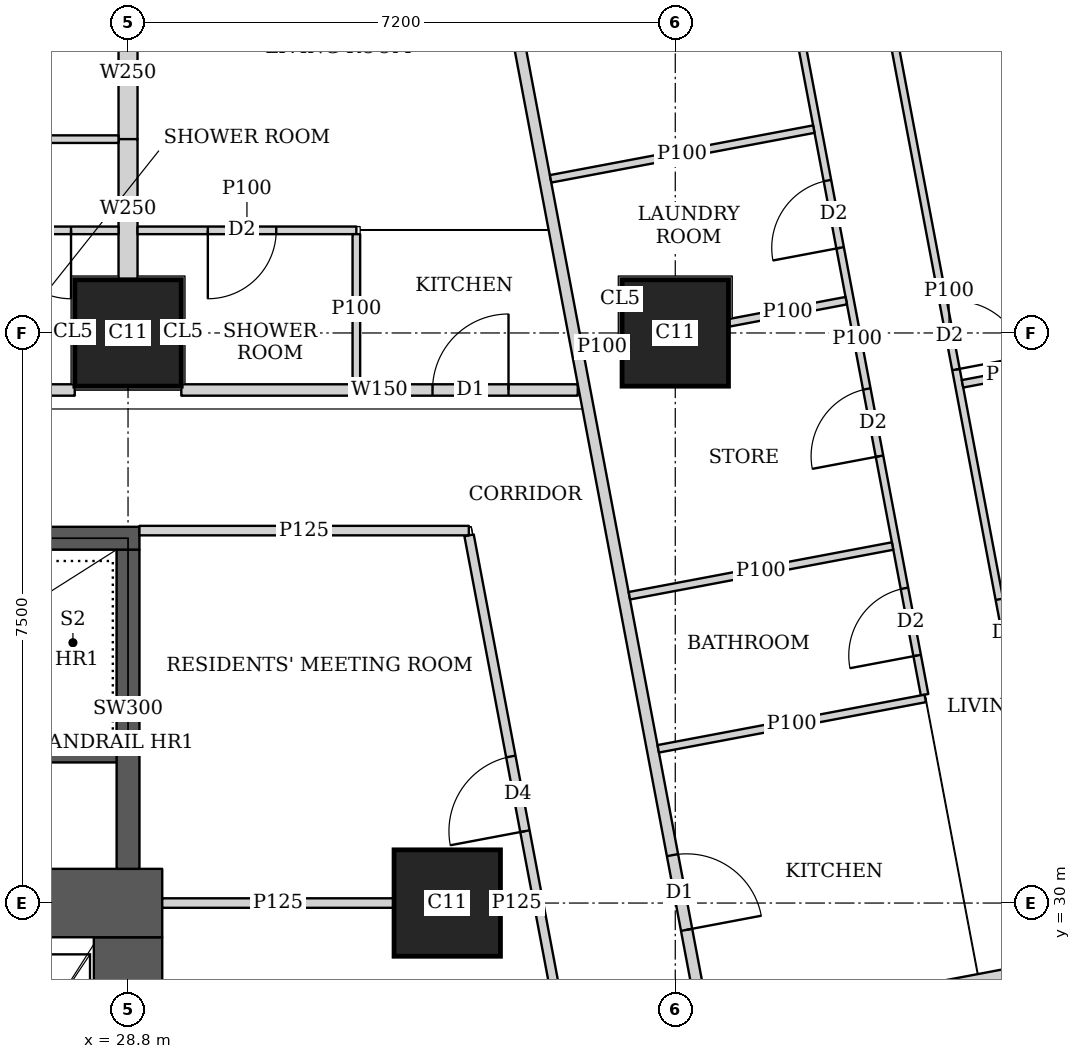
"""IFC4 building model, lengths in metres.
Left out: names, types, materials, properties, quantities, classifications, styles, units other than length and angle.
Written with IfcOpenShell. Run it as: python <this file> out.ifc"""

import sys

from ifc_helpers import new_model, si_unit, direction, frame, frame_2d, origin, origin_2d, place, context, subcontext, project, spatial, rectangle, extrude, element, fill, save


model = new_model("IFC4")
c1 = context("Model", 3, precision=1e-05, world=origin(), true_north=direction((0.0, 1.0)))
c2 = subcontext(c1, "Body", "Model", "MODEL_VIEW")
j1 = project(units=[si_unit("LENGTHUNIT", "METRE"), si_unit("PLANEANGLEUNIT", "RADIAN")], contexts=[c1])
p1 = place(None, origin())
s1 = spatial("IfcSite", under=j1, at=p1, CompositionType="ELEMENT")
p2 = place(p1, origin())
s2 = spatial("IfcBuilding", under=s1, at=p2, CompositionType="ELEMENT")
p3 = place(p2, frame((0.0, 0.0, 281.6)))
s3 = spatial("IfcBuildingStorey", under=s2, at=p3, CompositionType="ELEMENT", Elevation=281.6)
for number, where, z_axis, x_axis in (
    (1, (33.0, 30.0, 0.0), (0.0, 0.0, 1.0), (1.0, 0.0, 0.0)),
    (2, (28.8, 37.5, 0.0), (0.0, 0.0, 1.0), (1.0, 0.0, 0.0)),
    (3, (36.0, 37.5, 0.0), (0.0, 0.0, 1.0), (1.0, 0.0, 0.0)),
):
    element("IfcColumn", number, at=place(p3, frame(where, z_axis=z_axis, x_axis=x_axis)), inside=s3, PredefinedType="COLUMN", context=c2, shape_type="SweptSolid", body=[
        extrude(rectangle(XDim=1.4, YDim=1.4, at=origin_2d()), origin(), (0.0, 0.0, 1.0), 3.75),
    ])
p4 = place(p3, frame((13.95, 30.0, 0.0), z_axis=(0.0, 0.0, 1.0), x_axis=(1.0, 0.0, 0.0)))
e4 = element("IfcWall", 4, at=p4, inside=s3, PredefinedType="SHEAR", context=c2, shape_type="SweptSolid", body=[
    extrude(rectangle(XDim=15.3, YDim=0.9, at=frame_2d((7.65, 0.0))), origin(), (0.0, 0.0, 1.0), 3.75),
])
p5 = place(p4, frame((4.45, 0.0, 0.0)))
e5 = element("IfcOpeningElement", 5, at=p5, cuts=e4, PredefinedType="OPENING", context=c2, shape_type="SweptSolid", body=[
    extrude(rectangle(XDim=1.8, YDim=2.1, at=frame_2d((0.9, 1.05))), frame((0.0, 0.46, 0.0), z_axis=(0.0, -1.0, 0.0), x_axis=(1.0, 0.0, 0.0)), (0.0, 0.0, 1.0), 0.92),
])
p6 = place(p4, frame((10.7, 0.0, 0.0)))
e6 = element("IfcOpeningElement", 6, at=p6, cuts=e4, PredefinedType="OPENING", context=c2, shape_type="SweptSolid", body=[
    extrude(rectangle(XDim=1.1, YDim=2.1, at=frame_2d((0.55, 1.05))), frame((0.0, 0.46, 0.0), z_axis=(0.0, -1.0, 0.0), x_axis=(1.0, 0.0, 0.0)), (0.0, 0.0, 1.0), 0.92),
])
p7 = place(p3, frame((28.8, 15.45, 0.0), z_axis=(0.0, 0.0, 1.0), x_axis=(0.0, 1.0, 0.0)))
e7 = element("IfcWall", 7, at=p7, inside=s3, PredefinedType="SHEAR", context=c2, shape_type="SweptSolid", body=[
    extrude(rectangle(XDim=14.1, YDim=0.9, at=frame_2d((7.05, 0.0))), origin(), (0.0, 0.0, 1.0), 3.75),
])
p8 = place(p3, frame((21.45, 34.8, 0.0), z_axis=(0.0, 0.0, 1.0), x_axis=(1.0, 0.0, 0.0)))
e8 = element("IfcWall", 8, at=p8, inside=s3, PredefinedType="SHEAR", context=c2, shape_type="SweptSolid", body=[
    extrude(rectangle(XDim=7.5, YDim=0.3, at=frame_2d((3.75, 0.0))), origin(), (0.0, 0.0, 1.0), 3.75),
])
p9 = place(p8, frame((0.5, 0.0, 0.0)))
e9 = element("IfcOpeningElement", 9, at=p9, cuts=e8, PredefinedType="OPENING", context=c2, shape_type="SweptSolid", body=[
    extrude(rectangle(XDim=1.1, YDim=2.1, at=frame_2d((0.55, 1.05))), frame((0.0, 0.16, 0.0), z_axis=(0.0, -1.0, 0.0), x_axis=(1.0, 0.0, 0.0)), (0.0, 0.0, 1.0), 0.32),
])
p10 = place(p3, frame((28.8, 30.45, 0.0), z_axis=(0.0, 0.0, 1.0), x_axis=(0.0, 1.0, 0.0)))
e10 = element("IfcWall", 10, at=p10, inside=s3, PredefinedType="SHEAR", context=c2, shape_type="SweptSolid", body=[
    extrude(rectangle(XDim=4.2, YDim=0.3, at=frame_2d((2.1, 0.0))), origin(), (0.0, 0.0, 1.0), 3.75),
])
p11 = place(p3, frame((22.301, 36.75, 0.0), z_axis=(0.0, 0.0, 1.0), x_axis=(1.0, 0.0, 0.0)))
e11 = element("IfcWall", 11, at=p11, inside=s3, PredefinedType="SOLIDWALL", context=c2, shape_type="SweptSolid", body=[
    extrude(rectangle(XDim=5.798, YDim=0.15, at=frame_2d((2.899, 0.0))), origin(), (0.0, 0.0, 1.0), 3.5),
])
p12 = place(p3, frame((29.501, 36.75, 0.0), z_axis=(0.0, 0.0, 1.0), x_axis=(1.0, 0.0, 0.0)))
e12 = element("IfcWall", 12, at=p12, inside=s3, PredefinedType="SOLIDWALL", context=c2, shape_type="SweptSolid", body=[
    extrude(rectangle(XDim=5.216, YDim=0.15, at=frame_2d((2.608, 0.0))), origin(), (0.0, 0.0, 1.0), 3.5),
])
p13 = place(p12, frame((3.305, 0.0, 0.0)))
e13 = element("IfcOpeningElement", 13, at=p13, cuts=e12, PredefinedType="OPENING", context=c2, shape_type="SweptSolid", body=[
    extrude(rectangle(XDim=1.0, YDim=2.1, at=frame_2d((0.5, 1.05))), frame((0.0, 0.085, 0.0), z_axis=(0.0, -1.0, 0.0), x_axis=(1.0, 0.0, 0.0)), (0.0, 0.0, 1.0), 0.17),
])
p14 = place(p3, frame((33.781, 42.186, 0.0), z_axis=(0.0, 0.0, 1.0), x_axis=(0.185593518645, -0.9826266055, 0.0)))
e14 = element("IfcWall", 14, at=p14, inside=s3, PredefinedType="SOLIDWALL", context=c2, shape_type="SweptSolid", body=[
    extrude(rectangle(XDim=35.961, YDim=0.15, at=frame_2d((17.98, 0.0))), origin(), (0.0, 0.0, 1.0), 2.5),
])
p15 = place(p14, frame((11.76, 0.0, 0.0)))
e15 = element("IfcOpeningElement", 15, at=p15, cuts=e14, PredefinedType="OPENING", context=c2, shape_type="SweptSolid", body=[
    extrude(rectangle(XDim=1.0, YDim=2.1, at=frame_2d((0.5, 1.05))), frame((0.0, 0.085, 0.0), z_axis=(0.0, -1.0, 0.0), x_axis=(1.0, 0.0, 0.0)), (0.0, 0.0, 1.0), 0.17),
])
p16 = place(p14, frame((15.576, 0.0, 0.0)))
e16 = element("IfcOpeningElement", 16, at=p16, cuts=e14, PredefinedType="OPENING", context=c2, shape_type="SweptSolid", body=[
    extrude(rectangle(XDim=1.0, YDim=2.1, at=frame_2d((0.5, 1.05))), frame((0.0, 0.085, 0.0), z_axis=(0.0, -1.0, 0.0), x_axis=(1.0, 0.0, 0.0)), (0.0, 0.0, 1.0), 0.17),
])
p17 = place(p14, frame((30.502, 0.0, 0.0)))
e17 = element("IfcOpeningElement", 17, at=p17, cuts=e14, PredefinedType="OPENING", context=c2, shape_type="SweptSolid", body=[
    extrude(rectangle(XDim=1.0, YDim=2.1, at=frame_2d((0.5, 1.05))), frame((0.0, 0.085, 0.0), z_axis=(0.0, -1.0, 0.0), x_axis=(1.0, 0.0, 0.0)), (0.0, 0.0, 1.0), 0.17),
])
p18 = place(p3, frame((38.744, 42.045, 0.0), z_axis=(0.0, 0.0, 1.0), x_axis=(0.185588352162, -0.982627581305, 0.0)))
e18 = element("IfcWall", 18, at=p18, inside=s3, PredefinedType="PARTITIONING", context=c2, shape_type="SweptSolid", body=[
    extrude(rectangle(XDim=9.241, YDim=0.1, at=frame_2d((4.621, 0.0))), origin(), (0.0, 0.0, 1.0), 3.5),
])
p19 = place(p18, frame((8.191, 0.0, 0.0)))
e19 = element("IfcOpeningElement", 19, at=p19, cuts=e18, PredefinedType="OPENING", context=c2, shape_type="SweptSolid", body=[
    extrude(rectangle(XDim=0.9, YDim=2.1, at=frame_2d((0.45, 1.05))), frame((0.0, 0.06, 0.0), z_axis=(0.0, -1.0, 0.0), x_axis=(1.0, 0.0, 0.0)), (0.0, 0.0, 1.0), 0.12),
])
p20 = place(p18, frame((4.215, 0.0, 0.0)))
e20 = element("IfcOpeningElement", 20, at=p20, cuts=e18, PredefinedType="OPENING", context=c2, shape_type="SweptSolid", body=[
    extrude(rectangle(XDim=0.9, YDim=2.1, at=frame_2d((0.45, 1.05))), frame((0.0, 0.06, 0.0), z_axis=(0.0, -1.0, 0.0), x_axis=(1.0, 0.0, 0.0)), (0.0, 0.0, 1.0), 0.12),
])
p21 = place(p3, frame((37.51, 42.109, 0.0), z_axis=(0.0, 0.0, 1.0), x_axis=(0.185659798122, -0.982614084654, 0.0)))
e21 = element("IfcWall", 21, at=p21, inside=s3, PredefinedType="PARTITIONING", context=c2, shape_type="SweptSolid", body=[
    extrude(rectangle(XDim=9.534, YDim=0.1, at=frame_2d((4.767, 0.0))), origin(), (0.0, 0.0, 1.0), 3.5),
])
p22 = place(p21, frame((8.109, 0.0, 0.0)))
e22 = element("IfcOpeningElement", 22, at=p22, cuts=e21, PredefinedType="OPENING", context=c2, shape_type="SweptSolid", body=[
    extrude(rectangle(XDim=0.9, YDim=2.1, at=frame_2d((0.45, 1.05))), frame((0.0, 0.06, 0.0), z_axis=(0.0, -1.0, 0.0), x_axis=(1.0, 0.0, 0.0)), (0.0, 0.0, 1.0), 0.12),
])
p23 = place(p21, frame((2.65, 0.0, 0.0)))
e23 = element("IfcOpeningElement", 23, at=p23, cuts=e21, PredefinedType="OPENING", context=c2, shape_type="SweptSolid", body=[
    extrude(rectangle(XDim=0.9, YDim=2.1, at=frame_2d((0.45, 1.05))), frame((0.0, 0.06, 0.0), z_axis=(0.0, -1.0, 0.0), x_axis=(1.0, 0.0, 0.0)), (0.0, 0.0, 1.0), 0.12),
])
p24 = place(p21, frame((5.44, 0.0, 0.0)))
e24 = element("IfcOpeningElement", 24, at=p24, cuts=e21, PredefinedType="OPENING", context=c2, shape_type="SweptSolid", body=[
    extrude(rectangle(XDim=0.9, YDim=2.1, at=frame_2d((0.45, 1.05))), frame((0.0, 0.06, 0.0), z_axis=(0.0, -1.0, 0.0), x_axis=(1.0, 0.0, 0.0)), (0.0, 0.0, 1.0), 0.12),
])
p25 = place(p3, frame((41.054, 37.072, 0.0), z_axis=(0.0, 0.0, 1.0), x_axis=(-0.982602741717, -0.185719821156, 0.0)))
e25 = element("IfcWall", 25, at=p25, inside=s3, PredefinedType="PARTITIONING", context=c2, shape_type="SweptSolid", body=[
    extrude(rectangle(XDim=1.297, YDim=0.1, at=frame_2d((0.649, 0.0))), origin(), (0.0, 0.0, 1.0), 3.5),
])
p26 = place(p3, frame((37.823, 40.182, 0.0), z_axis=(0.0, 0.0, 1.0), x_axis=(-0.98263926043, -0.185526504472, 0.0)))
e26 = element("IfcWall", 26, at=p26, inside=s3, PredefinedType="PARTITIONING", context=c2, shape_type="SweptSolid", body=[
    extrude(rectangle(XDim=3.524, YDim=0.1, at=frame_2d((1.762, 0.0))), origin(), (0.0, 0.0, 1.0), 3.5),
])
p27 = place(p3, frame((38.25, 37.925, 0.0), z_axis=(0.0, 0.0, 1.0), x_axis=(-0.982610209589, -0.185680305934, 0.0)))
e27 = element("IfcWall", 27, at=p27, inside=s3, PredefinedType="PARTITIONING", context=c2, shape_type="SweptSolid", body=[
    extrude(rectangle(XDim=1.567, YDim=0.1, at=frame_2d((0.784, 0.0))), origin(), (0.0, 0.0, 1.0), 3.5),
])
p28 = place(p3, frame((35.29, 37.366, 0.0), z_axis=(0.0, 0.0, 1.0), x_axis=(-0.982715597703, -0.185121727606, 0.0)))
e28 = element("IfcWall", 28, at=p28, inside=s3, PredefinedType="PARTITIONING", context=c2, shape_type="SweptSolid", body=[
    extrude(rectangle(XDim=0.513, YDim=0.1, at=frame_2d((0.256, 0.0))), origin(), (0.0, 0.0, 1.0), 3.5),
])
p29 = place(p3, frame((39.289, 32.692, 0.0), z_axis=(0.0, 0.0, 1.0), x_axis=(-0.982662827464, -0.185401638399, 0.0)))
e29 = element("IfcWall", 29, at=p29, inside=s3, PredefinedType="PARTITIONING", context=c2, shape_type="SweptSolid", body=[
    extrude(rectangle(XDim=3.575, YDim=0.1, at=frame_2d((1.788, 0.0))), origin(), (0.0, 0.0, 1.0), 3.5),
])
p30 = place(p3, frame((38.859, 34.697, 0.0), z_axis=(0.0, 0.0, 1.0), x_axis=(-0.982626628545, -0.185593396635, 0.0)))
e30 = element("IfcWall", 30, at=p30, inside=s3, PredefinedType="PARTITIONING", context=c2, shape_type="SweptSolid", body=[
    extrude(rectangle(XDim=3.524, YDim=0.1, at=frame_2d((1.762, 0.0))), origin(), (0.0, 0.0, 1.0), 3.5),
])
p31 = place(p3, frame((41.177, 29.164, 0.0), z_axis=(0.0, 0.0, 1.0), x_axis=(-0.982642846239, -0.185507511263, 0.0)))
e31 = element("IfcWall", 31, at=p31, inside=s3, PredefinedType="SOLIDWALL", context=c2, shape_type="SweptSolid", body=[
    extrude(rectangle(XDim=4.776, YDim=0.25, at=frame_2d((2.388, 0.0))), origin(), (0.0, 0.0, 1.0), 2.5),
])
p32 = place(p3, frame((21.6, 40.05, 0.0), z_axis=(0.0, 0.0, 1.0), x_axis=(1.0, 0.0, 0.0)))
e32 = element("IfcWall", 32, at=p32, inside=s3, PredefinedType="PARTITIONING", context=c2, shape_type="SweptSolid", body=[
    extrude(rectangle(XDim=7.075, YDim=0.1, at=frame_2d((3.538, 0.0))), origin(), (0.0, 0.0, 1.0), 3.5),
])
p33 = place(p32, frame((0.2, 0.0, 0.0)))
e33 = element("IfcOpeningElement", 33, at=p33, cuts=e32, PredefinedType="OPENING", context=c2, shape_type="SweptSolid", body=[
    extrude(rectangle(XDim=0.9, YDim=2.1, at=frame_2d((0.45, 1.05))), frame((0.0, 0.06, 0.0), z_axis=(0.0, -1.0, 0.0), x_axis=(1.0, 0.0, 0.0)), (0.0, 0.0, 1.0), 0.12),
])
p34 = place(p32, frame((3.8, 0.0, 0.0)))
e34 = element("IfcOpeningElement", 34, at=p34, cuts=e32, PredefinedType="OPENING", context=c2, shape_type="SweptSolid", body=[
    extrude(rectangle(XDim=0.9, YDim=2.1, at=frame_2d((0.45, 1.05))), frame((0.0, 0.06, 0.0), z_axis=(0.0, -1.0, 0.0), x_axis=(1.0, 0.0, 0.0)), (0.0, 0.0, 1.0), 0.12),
])
p35 = place(p3, frame((21.6, 38.85, 0.0), z_axis=(0.0, 0.0, 1.0), x_axis=(1.0, 0.0, 0.0)))
e35 = element("IfcWall", 35, at=p35, inside=s3, PredefinedType="PARTITIONING", context=c2, shape_type="SweptSolid", body=[
    extrude(rectangle(XDim=7.075, YDim=0.1, at=frame_2d((3.538, 0.0))), origin(), (0.0, 0.0, 1.0), 3.5),
])
p36 = place(p35, frame((1.35, 0.0, 0.0)))
e36 = element("IfcOpeningElement", 36, at=p36, cuts=e35, PredefinedType="OPENING", context=c2, shape_type="SweptSolid", body=[
    extrude(rectangle(XDim=0.9, YDim=2.1, at=frame_2d((0.45, 1.05))), frame((0.0, 0.06, 0.0), z_axis=(0.0, -1.0, 0.0), x_axis=(1.0, 0.0, 0.0)), (0.0, 0.0, 1.0), 0.12),
])
p37 = place(p35, frame((5.55, 0.0, 0.0)))
e37 = element("IfcOpeningElement", 37, at=p37, cuts=e35, PredefinedType="OPENING", context=c2, shape_type="SweptSolid", body=[
    extrude(rectangle(XDim=0.9, YDim=2.1, at=frame_2d((0.45, 1.05))), frame((0.0, 0.06, 0.0), z_axis=(0.0, -1.0, 0.0), x_axis=(1.0, 0.0, 0.0)), (0.0, 0.0, 1.0), 0.12),
])
p38 = place(p3, frame((28.925, 38.85, 0.0), z_axis=(0.0, 0.0, 1.0), x_axis=(1.0, 0.0, 0.0)))
e38 = element("IfcWall", 38, at=p38, inside=s3, PredefinedType="PARTITIONING", context=c2, shape_type="SweptSolid", body=[
    extrude(rectangle(XDim=2.879, YDim=0.1, at=frame_2d((1.439, 0.0))), origin(), (0.0, 0.0, 1.0), 3.5),
])
p39 = place(p38, frame((0.925, 0.0, 0.0)))
e39 = element("IfcOpeningElement", 39, at=p39, cuts=e38, PredefinedType="OPENING", context=c2, shape_type="SweptSolid", body=[
    extrude(rectangle(XDim=0.9, YDim=2.1, at=frame_2d((0.45, 1.05))), frame((0.0, 0.06, 0.0), z_axis=(0.0, -1.0, 0.0), x_axis=(1.0, 0.0, 0.0)), (0.0, 0.0, 1.0), 0.12),
])
p40 = place(p3, frame((31.804, 36.825, 0.0), z_axis=(0.0, 0.0, 1.0), x_axis=(0.0, 1.0, 0.0)))
e40 = element("IfcWall", 40, at=p40, inside=s3, PredefinedType="PARTITIONING", context=c2, shape_type="SweptSolid", body=[
    extrude(rectangle(XDim=1.975, YDim=0.1, at=frame_2d((0.988, 0.0))), origin(), (0.0, 0.0, 1.0), 3.5),
])
p41 = place(p3, frame((28.8, 40.05, 0.0), z_axis=(0.0, 0.0, 1.0), x_axis=(0.0, 1.0, 0.0)))
e41 = element("IfcWall", 41, at=p41, inside=s3, PredefinedType="SOLIDWALL", context=c2, shape_type="SweptSolid", body=[
    extrude(rectangle(XDim=1.749, YDim=0.25, at=frame_2d((0.875, 0.0))), origin(), (0.0, 0.0, 1.0), 3.5),
])
p42 = place(p3, frame((28.8, 38.201, 0.0), z_axis=(0.0, 0.0, 1.0), x_axis=(0.0, 1.0, 0.0)))
e42 = element("IfcWall", 42, at=p42, inside=s3, PredefinedType="SOLIDWALL", context=c2, shape_type="SweptSolid", body=[
    extrude(rectangle(XDim=1.849, YDim=0.25, at=frame_2d((0.925, 0.0))), origin(), (0.0, 0.0, 1.0), 3.5),
])
p43 = place(p3, frame((28.95, 34.9, 0.0), z_axis=(0.0, 0.0, 1.0), x_axis=(1.0, 0.0, 0.0)))
e43 = element("IfcWall", 43, at=p43, inside=s3, PredefinedType="PARTITIONING", context=c2, shape_type="SweptSolid", body=[
    extrude(rectangle(XDim=4.334, YDim=0.125, at=frame_2d((2.167, 0.0))), origin(), (0.0, 0.0, 1.0), 3.5),
])
p44 = place(p3, frame((37.947, 10.163, 0.0), z_axis=(0.0, 0.0, 1.0), x_axis=(-0.185572770922, 0.982630523998, 0.0)))
e44 = element("IfcWall", 44, at=p44, inside=s3, PredefinedType="PARTITIONING", context=c2, shape_type="SweptSolid", body=[
    extrude(rectangle(XDim=25.111, YDim=0.125, at=frame_2d((12.556, 0.0))), origin(), (0.0, 0.0, 1.0), 2.5),
])
p45 = place(p44, frame((0.708, 0.0, 0.0)))
e45 = element("IfcOpeningElement", 45, at=p45, cuts=e44, PredefinedType="OPENING", context=c2, shape_type="SweptSolid", body=[
    extrude(rectangle(XDim=1.0, YDim=2.1, at=frame_2d((0.5, 1.05))), frame((0.0, 0.073, 0.0), z_axis=(0.0, -1.0, 0.0), x_axis=(1.0, 0.0, 0.0)), (0.0, 0.0, 1.0), 0.145),
])
p46 = place(p44, frame((5.9, 0.0, 0.0)))
e46 = element("IfcOpeningElement", 46, at=p46, cuts=e44, PredefinedType="OPENING", context=c2, shape_type="SweptSolid", body=[
    extrude(rectangle(XDim=1.0, YDim=2.1, at=frame_2d((0.5, 1.05))), frame((0.0, 0.073, 0.0), z_axis=(0.0, -1.0, 0.0), x_axis=(1.0, 0.0, 0.0)), (0.0, 0.0, 1.0), 0.145),
])
p47 = place(p44, frame((13.378, 0.0, 0.0)))
e47 = element("IfcOpeningElement", 47, at=p47, cuts=e44, PredefinedType="OPENING", context=c2, shape_type="SweptSolid", body=[
    extrude(rectangle(XDim=1.0, YDim=2.1, at=frame_2d((0.5, 1.05))), frame((0.0, 0.073, 0.0), z_axis=(0.0, -1.0, 0.0), x_axis=(1.0, 0.0, 0.0)), (0.0, 0.0, 1.0), 0.145),
])
p48 = place(p44, frame((21.15, 0.0, 0.0)))
e48 = element("IfcOpeningElement", 48, at=p48, cuts=e44, PredefinedType="OPENING", context=c2, shape_type="SweptSolid", body=[
    extrude(rectangle(XDim=1.0, YDim=2.1, at=frame_2d((0.5, 1.05))), frame((0.0, 0.073, 0.0), z_axis=(0.0, -1.0, 0.0), x_axis=(1.0, 0.0, 0.0)), (0.0, 0.0, 1.0), 0.145),
])
p49 = place(p3, frame((29.25, 30.0, 0.0), z_axis=(0.0, 0.0, 1.0), x_axis=(1.0, 0.0, 0.0)))
e49 = element("IfcWall", 49, at=p49, inside=s3, PredefinedType="PARTITIONING", context=c2, shape_type="SweptSolid", body=[
    extrude(rectangle(XDim=3.049, YDim=0.125, at=frame_2d((1.524, 0.0))), origin(), (0.0, 0.0, 1.0), 3.5),
])
p50 = place(p3, frame((33.701, 30.0, 0.0), z_axis=(0.0, 0.0, 1.0), x_axis=(1.0, 0.0, 0.0)))
e50 = element("IfcWall", 50, at=p50, inside=s3, PredefinedType="PARTITIONING", context=c2, shape_type="SweptSolid", body=[
    extrude(rectangle(XDim=0.424, YDim=0.125, at=frame_2d((0.212, 0.0))), origin(), (0.0, 0.0, 1.0), 2.5),
])
p51 = place(p3, frame((23.0, 31.95, 0.0), z_axis=(0.0, 0.0, 1.0), x_axis=(1.0, 0.0, 0.0)))
e51 = element("IfcWall", 51, at=p51, inside=s3, PredefinedType="SHEAR", context=c2, shape_type="SweptSolid", body=[
    extrude(rectangle(XDim=5.8, YDim=0.2, at=frame_2d((2.9, 0.0))), origin(), (0.0, 0.0, 1.0), 3.75),
])
p52 = place(p19, origin())
e52 = element("IfcDoor", 52, at=p52, inside=s3, OperationType="SINGLE_SWING_RIGHT", PredefinedType="DOOR", context=c2, shape_type="SweptSolid", body=[
    extrude(rectangle(XDim=0.9, YDim=2.1, at=frame_2d((0.45, 1.05))), frame((0.0, 0.025, 0.0), z_axis=(0.0, -1.0, 0.0), x_axis=(1.0, 0.0, 0.0)), (0.0, 0.0, 1.0), 0.05),
])
fill(e19, e52)
p53 = place(p20, origin())
e53 = element("IfcDoor", 53, at=p53, inside=s3, OperationType="SINGLE_SWING_RIGHT", PredefinedType="DOOR", context=c2, shape_type="SweptSolid", body=[
    extrude(rectangle(XDim=0.9, YDim=2.1, at=frame_2d((0.45, 1.05))), frame((0.0, 0.025, 0.0), z_axis=(0.0, -1.0, 0.0), x_axis=(1.0, 0.0, 0.0)), (0.0, 0.0, 1.0), 0.05),
])
fill(e20, e53)
p54 = place(p22, origin())
e54 = element("IfcDoor", 54, at=p54, inside=s3, OperationType="SINGLE_SWING_LEFT", PredefinedType="DOOR", context=c2, shape_type="SweptSolid", body=[
    extrude(rectangle(XDim=0.9, YDim=2.1, at=frame_2d((0.45, 1.05))), frame((0.0, 0.025, 0.0), z_axis=(0.0, -1.0, 0.0), x_axis=(1.0, 0.0, 0.0)), (0.0, 0.0, 1.0), 0.05),
])
fill(e22, e54)
p55 = place(p23, origin())
e55 = element("IfcDoor", 55, at=p55, inside=s3, OperationType="SINGLE_SWING_LEFT", PredefinedType="DOOR", context=c2, shape_type="SweptSolid", body=[
    extrude(rectangle(XDim=0.9, YDim=2.1, at=frame_2d((0.45, 1.05))), frame((0.0, 0.025, 0.0), z_axis=(0.0, -1.0, 0.0), x_axis=(1.0, 0.0, 0.0)), (0.0, 0.0, 1.0), 0.05),
])
fill(e23, e55)
p56 = place(p24, origin())
e56 = element("IfcDoor", 56, at=p56, inside=s3, OperationType="SINGLE_SWING_LEFT", PredefinedType="DOOR", context=c2, shape_type="SweptSolid", body=[
    extrude(rectangle(XDim=0.9, YDim=2.1, at=frame_2d((0.45, 1.05))), frame((0.0, 0.025, 0.0), z_axis=(0.0, -1.0, 0.0), x_axis=(1.0, 0.0, 0.0)), (0.0, 0.0, 1.0), 0.05),
])
fill(e24, e56)
p57 = place(p15, origin())
e57 = element("IfcDoor", 57, at=p57, inside=s3, OperationType="SINGLE_SWING_RIGHT", PredefinedType="DOOR", context=c2, shape_type="SweptSolid", body=[
    extrude(rectangle(XDim=1.0, YDim=2.1, at=frame_2d((0.5, 1.05))), frame((0.0, 0.025, 0.0), z_axis=(0.0, -1.0, 0.0), x_axis=(1.0, 0.0, 0.0)), (0.0, 0.0, 1.0), 0.05),
])
fill(e15, e57)
p58 = place(p37, origin())
e58 = element("IfcDoor", 58, at=p58, inside=s3, OperationType="SINGLE_SWING_LEFT", PredefinedType="DOOR", context=c2, shape_type="SweptSolid", body=[
    extrude(rectangle(XDim=0.9, YDim=2.1, at=frame_2d((0.45, 1.05))), frame((0.0, 0.025, 0.0), z_axis=(0.0, -1.0, 0.0), x_axis=(1.0, 0.0, 0.0)), (0.0, 0.0, 1.0), 0.05),
])
fill(e37, e58)
p59 = place(p39, origin())
e59 = element("IfcDoor", 59, at=p59, inside=s3, OperationType="SINGLE_SWING_RIGHT", PredefinedType="DOOR", context=c2, shape_type="SweptSolid", body=[
    extrude(rectangle(XDim=0.9, YDim=2.1, at=frame_2d((0.45, 1.05))), frame((0.0, 0.025, 0.0), z_axis=(0.0, -1.0, 0.0), x_axis=(1.0, 0.0, 0.0)), (0.0, 0.0, 1.0), 0.05),
])
fill(e39, e59)
p60 = place(p13, origin())
e60 = element("IfcDoor", 60, at=p60, inside=s3, OperationType="SINGLE_SWING_RIGHT", PredefinedType="DOOR", context=c2, shape_type="SweptSolid", body=[
    extrude(rectangle(XDim=1.0, YDim=2.1, at=frame_2d((0.5, 1.05))), frame((0.0, 0.025, 0.0), z_axis=(0.0, -1.0, 0.0), x_axis=(1.0, 0.0, 0.0)), (0.0, 0.0, 1.0), 0.05),
])
fill(e13, e60)
p61 = place(p48, origin())
e61 = element("IfcDoor", 61, at=p61, inside=s3, OperationType="SINGLE_SWING_LEFT", PredefinedType="DOOR", context=c2, shape_type="SweptSolid", body=[
    extrude(rectangle(XDim=1.0, YDim=2.1, at=frame_2d((0.5, 1.05))), frame((0.0, 0.025, 0.0), z_axis=(0.0, -1.0, 0.0), x_axis=(1.0, 0.0, 0.0)), (0.0, 0.0, 1.0), 0.05),
])
fill(e48, e61)
save(model, sys.argv[1])
